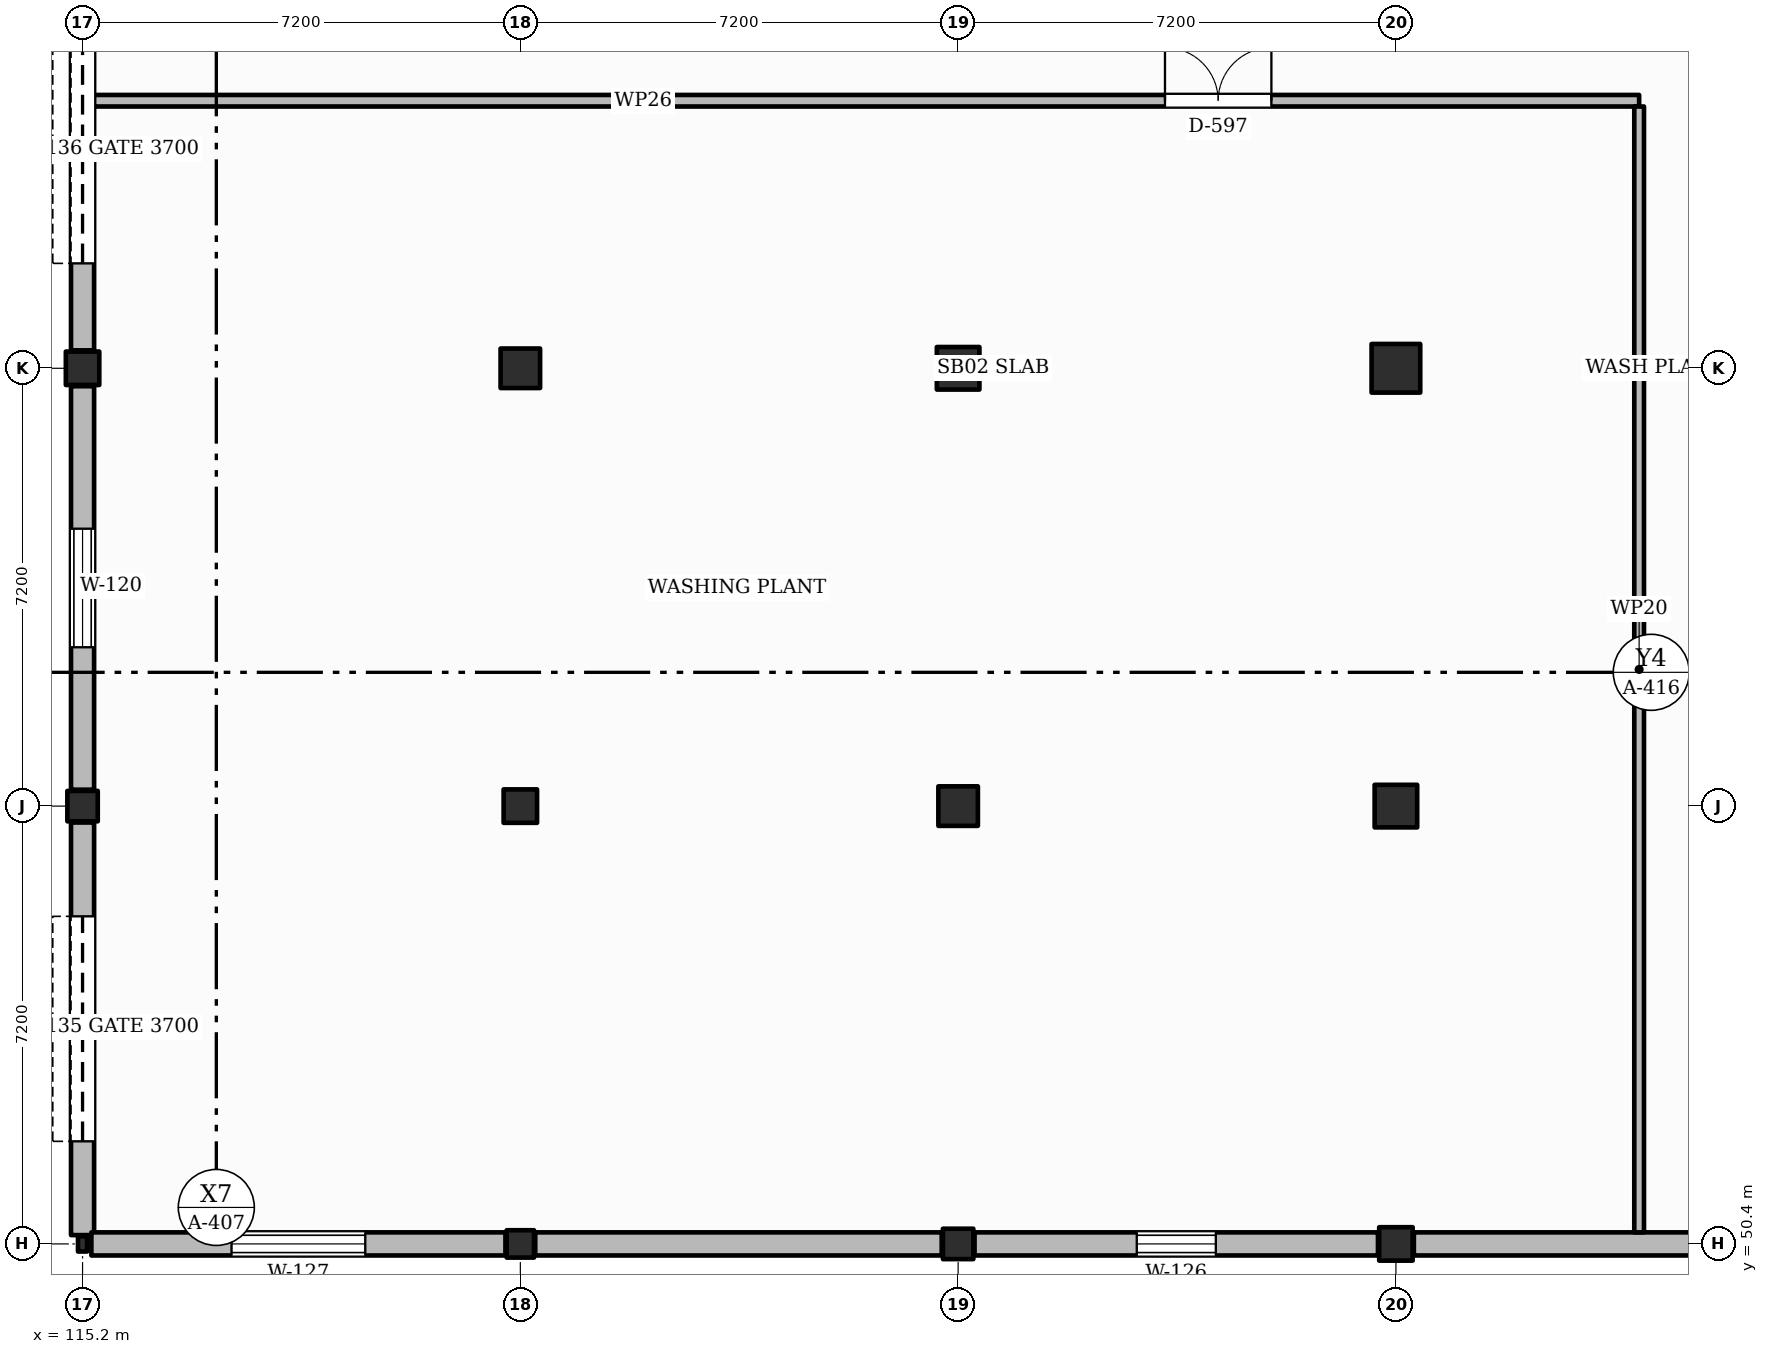
"""IFC4 building model, lengths in metres.
Left out: names, types, materials, properties, quantities, classifications, styles, units other than length and angle.
Written with IfcOpenShell. Run it as: python <this file> out.ifc"""

import sys

from ifc_helpers import new_model, si_unit, direction, frame, frame_2d, origin, origin_2d, place, context, subcontext, project, spatial, rectangle, hollow_rectangle, extrude, element, fill, save


model = new_model("IFC4")
c1 = context("Model", 3, precision=1e-05, world=origin(), true_north=direction((0.0, 1.0)))
c2 = subcontext(c1, "Body", "Model", "MODEL_VIEW")
j1 = project(units=[si_unit("LENGTHUNIT", "METRE"), si_unit("PLANEANGLEUNIT", "RADIAN")], contexts=[c1])
p1 = place(None, origin())
s1 = spatial("IfcSite", under=j1, at=p1, CompositionType="ELEMENT")
p2 = place(p1, origin())
s2 = spatial("IfcBuilding", under=s1, at=p2, CompositionType="ELEMENT")
p3 = place(p2, origin())
s3 = spatial("IfcBuildingStorey", under=s2, at=p3, CompositionType="ELEMENT", Elevation=0.0)
p4 = place(p3, frame((115.2, 50.4, -0.3), z_axis=(0.0, 0.0, 1.0), x_axis=(1.0, 0.0, 0.0)))
e1 = element("IfcColumn", 1, at=p4, inside=s3, PredefinedType="COLUMN", context=c2, shape_type="SweptSolid", body=[
    extrude(hollow_rectangle(XDim=0.15, YDim=0.25, WallThickness=0.01, InnerFilletRadius=0.005, OuterFilletRadius=0.015, at=origin_2d()), origin(), (0.0, 0.0, 1.0), 5.7),
])
p5 = place(p3, frame((115.2, 57.6, -0.3), z_axis=(0.0, 0.0, 1.0), x_axis=(1.0, 0.0, 0.0)))
e2 = element("IfcColumn", 2, at=p5, inside=s3, PredefinedType="COLUMN", context=c2, shape_type="SweptSolid", body=[
    extrude(rectangle(XDim=0.5, YDim=0.5, at=origin_2d()), origin(), (0.0, 0.0, 1.0), 5.7),
])
p6 = place(p3, frame((115.2, 64.8, -0.3), z_axis=(0.0, 0.0, 1.0), x_axis=(1.0, 0.0, 0.0)))
e3 = element("IfcColumn", 3, at=p6, inside=s3, PredefinedType="COLUMN", context=c2, shape_type="SweptSolid", body=[
    extrude(rectangle(XDim=0.55, YDim=0.55, at=origin_2d()), origin(), (0.0, 0.0, 1.0), 5.7),
])
p7 = place(p3, frame((122.4, 50.4, -0.3), z_axis=(0.0, 0.0, 1.0), x_axis=(1.0, 0.0, 0.0)))
e4 = element("IfcColumn", 4, at=p7, inside=s3, PredefinedType="COLUMN", context=c2, shape_type="SweptSolid", body=[
    extrude(rectangle(XDim=0.45, YDim=0.45, at=origin_2d()), origin(), (0.0, 0.0, 1.0), 5.7),
])
p8 = place(p3, frame((122.4, 57.6, -0.3), z_axis=(0.0, 0.0, 1.0), x_axis=(1.0, 0.0, 0.0)))
e5 = element("IfcColumn", 5, at=p8, inside=s3, PredefinedType="COLUMN", context=c2, shape_type="SweptSolid", body=[
    extrude(rectangle(XDim=0.55, YDim=0.55, at=origin_2d()), origin(), (0.0, 0.0, 1.0), 5.7),
])
p9 = place(p3, frame((122.4, 64.8, -0.3), z_axis=(0.0, 0.0, 1.0), x_axis=(1.0, 0.0, 0.0)))
e6 = element("IfcColumn", 6, at=p9, inside=s3, PredefinedType="COLUMN", context=c2, shape_type="SweptSolid", body=[
    extrude(rectangle(XDim=0.65, YDim=0.65, at=origin_2d()), origin(), (0.0, 0.0, 1.0), 5.7),
])
p10 = place(p3, frame((129.6, 50.4, -0.3), z_axis=(0.0, 0.0, 1.0), x_axis=(1.0, 0.0, 0.0)))
e7 = element("IfcColumn", 7, at=p10, inside=s3, PredefinedType="COLUMN", context=c2, shape_type="SweptSolid", body=[
    extrude(rectangle(XDim=0.5, YDim=0.5, at=origin_2d()), origin(), (0.0, 0.0, 1.0), 5.7),
])
p11 = place(p3, frame((129.6, 57.6, -0.3), z_axis=(0.0, 0.0, 1.0), x_axis=(1.0, 0.0, 0.0)))
e8 = element("IfcColumn", 8, at=p11, inside=s3, PredefinedType="COLUMN", context=c2, shape_type="SweptSolid", body=[
    extrude(rectangle(XDim=0.65, YDim=0.65, at=origin_2d()), origin(), (0.0, 0.0, 1.0), 5.7),
])
p12 = place(p3, frame((129.6, 64.8, -0.3), z_axis=(0.0, 0.0, 1.0), x_axis=(1.0, 0.0, 0.0)))
e9 = element("IfcColumn", 9, at=p12, inside=s3, PredefinedType="COLUMN", context=c2, shape_type="SweptSolid", body=[
    extrude(rectangle(XDim=0.7, YDim=0.7, at=origin_2d()), origin(), (0.0, 0.0, 1.0), 5.7),
])
p13 = place(p3, frame((136.8, 50.4, -0.3), z_axis=(0.0, 0.0, 1.0), x_axis=(1.0, 0.0, 0.0)))
e10 = element("IfcColumn", 10, at=p13, inside=s3, PredefinedType="COLUMN", context=c2, shape_type="SweptSolid", body=[
    extrude(rectangle(XDim=0.55, YDim=0.55, at=origin_2d()), origin(), (0.0, 0.0, 1.0), 5.7),
])
p14 = place(p3, frame((136.8, 57.6, -0.3), z_axis=(0.0, 0.0, 1.0), x_axis=(1.0, 0.0, 0.0)))
e11 = element("IfcColumn", 11, at=p14, inside=s3, PredefinedType="COLUMN", context=c2, shape_type="SweptSolid", body=[
    extrude(rectangle(XDim=0.7, YDim=0.7, at=origin_2d()), origin(), (0.0, 0.0, 1.0), 5.7),
])
p15 = place(p3, frame((136.8, 64.8, -0.3), z_axis=(0.0, 0.0, 1.0), x_axis=(1.0, 0.0, 0.0)))
e12 = element("IfcColumn", 12, at=p15, inside=s3, PredefinedType="COLUMN", context=c2, shape_type="SweptSolid", body=[
    extrude(rectangle(XDim=0.8, YDim=0.8, at=origin_2d()), origin(), (0.0, 0.0, 1.0), 5.7),
])
p16 = place(p3, frame((115.2, 50.545, 0.0), z_axis=(0.0, 0.0, 1.0), x_axis=(0.0, 1.0, 0.0)))
e13 = element("IfcWall", 13, at=p16, inside=s3, PredefinedType="SOLIDWALL", context=c2, shape_type="SweptSolid", body=[
    extrude(rectangle(XDim=6.785, YDim=0.38, at=frame_2d((3.393, 0.0))), origin(), (0.0, 0.0, 1.0), 4.31),
])
p17 = place(p16, frame((1.542, 0.0, 0.0)))
e14 = element("IfcOpeningElement", 14, at=p17, cuts=e13, PredefinedType="OPENING", context=c2, shape_type="SweptSolid", body=[
    extrude(rectangle(XDim=3.7, YDim=4.4, at=frame_2d((1.85, 2.2))), frame((0.0, 0.2, 0.0), z_axis=(0.0, -1.0, 0.0), x_axis=(1.0, 0.0, 0.0)), (0.0, 0.0, 1.0), 0.4),
])
p18 = place(p3, frame((115.2, 57.87, 0.0), z_axis=(0.0, 0.0, 1.0), x_axis=(0.0, 1.0, 0.0)))
e15 = element("IfcWall", 15, at=p18, inside=s3, PredefinedType="SOLIDWALL", context=c2, shape_type="SweptSolid", body=[
    extrude(rectangle(XDim=6.635, YDim=0.38, at=frame_2d((3.317, 0.0))), origin(), (0.0, 0.0, 1.0), 4.523),
])
p19 = place(p18, frame((2.342, 0.0, 1.05)))
e16 = element("IfcOpeningElement", 16, at=p19, cuts=e15, PredefinedType="OPENING", context=c2, shape_type="SweptSolid", body=[
    extrude(rectangle(XDim=1.95, YDim=2.25, at=frame_2d((0.975, 1.125))), frame((0.0, 0.2, 0.0), z_axis=(0.0, -1.0, 0.0), x_axis=(1.0, 0.0, 0.0)), (0.0, 0.0, 1.0), 0.4),
])
p20 = place(p3, frame((115.2, 65.095, 0.0), z_axis=(0.0, 0.0, 1.0), x_axis=(0.0, 1.0, 0.0)))
e17 = element("IfcWall", 17, at=p20, inside=s3, PredefinedType="SOLIDWALL", context=c2, shape_type="SweptSolid", body=[
    extrude(rectangle(XDim=6.56, YDim=0.38, at=frame_2d((3.28, 0.0))), origin(), (0.0, 0.0, 1.0), 4.523),
])
p21 = place(p20, frame((1.43, 0.0, 0.0)))
e18 = element("IfcOpeningElement", 18, at=p21, cuts=e17, PredefinedType="OPENING", context=c2, shape_type="SweptSolid", body=[
    extrude(rectangle(XDim=3.7, YDim=4.4, at=frame_2d((1.85, 2.2))), frame((0.0, 0.2, 0.0), z_axis=(0.0, -1.0, 0.0), x_axis=(1.0, 0.0, 0.0)), (0.0, 0.0, 1.0), 0.4),
])
p22 = place(p3, frame((143.655, 50.4, 0.0), z_axis=(0.0, 0.0, 1.0), x_axis=(-1.0, 0.0, 0.0)))
e19 = element("IfcWall", 19, at=p22, inside=s3, PredefinedType="SOLIDWALL", context=c2, shape_type="SweptSolid", body=[
    extrude(rectangle(XDim=6.56, YDim=0.38, at=frame_2d((3.28, 0.0))), origin(), (0.0, 0.0, 1.0), 4.6),
])
p23 = place(p3, frame((136.505, 50.4, 0.0), z_axis=(0.0, 0.0, 1.0), x_axis=(-1.0, 0.0, 0.0)))
e20 = element("IfcWall", 20, at=p23, inside=s3, PredefinedType="SOLIDWALL", context=c2, shape_type="SweptSolid", body=[
    extrude(rectangle(XDim=6.635, YDim=0.38, at=frame_2d((3.317, 0.0))), origin(), (0.0, 0.0, 1.0), 4.21),
])
p24 = place(p23, frame((2.667, 0.0, 1.05)))
e21 = element("IfcOpeningElement", 21, at=p24, cuts=e20, PredefinedType="OPENING", context=c2, shape_type="SweptSolid", body=[
    extrude(rectangle(XDim=1.3, YDim=1.6, at=frame_2d((0.65, 0.8))), frame((0.0, 0.2, 0.0), z_axis=(0.0, -1.0, 0.0), x_axis=(1.0, 0.0, 0.0)), (0.0, 0.0, 1.0), 0.4),
])
p25 = place(p3, frame((129.33, 50.4, 0.0), z_axis=(0.0, 0.0, 1.0), x_axis=(-1.0, 0.0, 0.0)))
e22 = element("IfcWall", 22, at=p25, inside=s3, PredefinedType="SOLIDWALL", context=c2, shape_type="SweptSolid", body=[
    extrude(rectangle(XDim=6.685, YDim=0.38, at=frame_2d((3.343, 0.0))), origin(), (0.0, 0.0, 1.0), 4.21),
])
p26 = place(p3, frame((122.155, 50.4, 0.0), z_axis=(0.0, 0.0, 1.0), x_axis=(-1.0, 0.0, 0.0)))
e23 = element("IfcWall", 23, at=p26, inside=s3, PredefinedType="SOLIDWALL", context=c2, shape_type="SweptSolid", body=[
    extrude(rectangle(XDim=6.81, YDim=0.38, at=frame_2d((3.405, 0.0))), origin(), (0.0, 0.0, 1.0), 4.21),
])
p27 = place(p26, frame((2.305, 0.0, 1.05)))
e24 = element("IfcOpeningElement", 24, at=p27, cuts=e23, PredefinedType="OPENING", context=c2, shape_type="SweptSolid", body=[
    extrude(rectangle(XDim=2.2, YDim=1.35, at=frame_2d((1.1, 0.675))), frame((0.0, 0.2, 0.0), z_axis=(0.0, -1.0, 0.0), x_axis=(1.0, 0.0, 0.0)), (0.0, 0.0, 1.0), 0.4),
])
p28 = place(p3, frame((115.39, 69.2, 0.0), z_axis=(0.0, 0.0, 1.0), x_axis=(1.0, 0.0, 0.0)))
e25 = element("IfcWall", 25, at=p28, inside=s3, PredefinedType="PARTITIONING", context=c2, shape_type="SweptSolid", body=[
    extrude(rectangle(XDim=25.41, YDim=0.19, at=frame_2d((12.705, 0.0))), origin(), (0.0, 0.0, 1.0), 3.55),
])
p29 = place(p28, frame((17.612, 0.0, 0.0)))
e26 = element("IfcOpeningElement", 26, at=p29, cuts=e25, PredefinedType="OPENING", context=c2, shape_type="SweptSolid", body=[
    extrude(rectangle(XDim=1.75, YDim=2.25, at=frame_2d((0.875, 1.125))), frame((0.0, 0.105, 0.0), z_axis=(0.0, -1.0, 0.0), x_axis=(1.0, 0.0, 0.0)), (0.0, 0.0, 1.0), 0.21),
])
p30 = place(p3, frame((140.8, 50.59, 0.0), z_axis=(0.0, 0.0, 1.0), x_axis=(0.0, 1.0, 0.0)))
e27 = element("IfcWall", 27, at=p30, inside=s3, PredefinedType="PARTITIONING", context=c2, shape_type="SweptSolid", body=[
    extrude(rectangle(XDim=18.515, YDim=0.16, at=frame_2d((9.257, 0.0))), origin(), (0.0, 0.0, 1.0), 3.55),
])
p31 = place(p19, origin())
e28 = element("IfcWindow", 28, at=p31, inside=s3, PartitioningType="SINGLE_PANEL", PredefinedType="WINDOW", context=c2, shape_type="SweptSolid", body=[
    extrude(rectangle(XDim=1.95, YDim=2.25, at=frame_2d((0.975, 1.125))), frame((0.0, 0.03, 0.0), z_axis=(0.0, -1.0, 0.0), x_axis=(1.0, 0.0, 0.0)), (0.0, 0.0, 1.0), 0.06),
])
fill(e16, e28)
p32 = place(p24, origin())
e29 = element("IfcWindow", 29, at=p32, inside=s3, PartitioningType="SINGLE_PANEL", PredefinedType="WINDOW", context=c2, shape_type="SweptSolid", body=[
    extrude(rectangle(XDim=1.3, YDim=1.6, at=frame_2d((0.65, 0.8))), frame((0.0, 0.03, 0.0), z_axis=(0.0, -1.0, 0.0), x_axis=(1.0, 0.0, 0.0)), (0.0, 0.0, 1.0), 0.06),
])
fill(e21, e29)
p33 = place(p27, origin())
e30 = element("IfcWindow", 30, at=p33, inside=s3, PartitioningType="SINGLE_PANEL", PredefinedType="WINDOW", context=c2, shape_type="SweptSolid", body=[
    extrude(rectangle(XDim=2.2, YDim=1.35, at=frame_2d((1.1, 0.675))), frame((0.0, 0.03, 0.0), z_axis=(0.0, -1.0, 0.0), x_axis=(1.0, 0.0, 0.0)), (0.0, 0.0, 1.0), 0.06),
])
fill(e24, e30)
p34 = place(p17, origin())
e31 = element("IfcDoor", 31, at=p34, inside=s3, OperationType="ROLLINGUP", PredefinedType="GATE", context=c2, shape_type="SweptSolid", body=[
    extrude(rectangle(XDim=3.7, YDim=4.4, at=frame_2d((1.85, 2.2))), frame((0.0, 0.025, 0.0), z_axis=(0.0, -1.0, 0.0), x_axis=(1.0, 0.0, 0.0)), (0.0, 0.0, 1.0), 0.05),
])
fill(e14, e31)
p35 = place(p21, origin())
e32 = element("IfcDoor", 32, at=p35, inside=s3, OperationType="ROLLINGUP", PredefinedType="GATE", context=c2, shape_type="SweptSolid", body=[
    extrude(rectangle(XDim=3.7, YDim=4.4, at=frame_2d((1.85, 2.2))), frame((0.0, 0.025, 0.0), z_axis=(0.0, -1.0, 0.0), x_axis=(1.0, 0.0, 0.0)), (0.0, 0.0, 1.0), 0.05),
])
fill(e18, e32)
p36 = place(p29, origin())
e33 = element("IfcDoor", 33, at=p36, inside=s3, OperationType="DOUBLE_SWING_LEFT", PredefinedType="DOOR", context=c2, shape_type="SweptSolid", body=[
    extrude(rectangle(XDim=1.75, YDim=2.25, at=frame_2d((0.875, 1.125))), frame((0.0, 0.025, 0.0), z_axis=(0.0, -1.0, 0.0), x_axis=(1.0, 0.0, 0.0)), (0.0, 0.0, 1.0), 0.05),
])
fill(e26, e33)
save(model, sys.argv[1])
